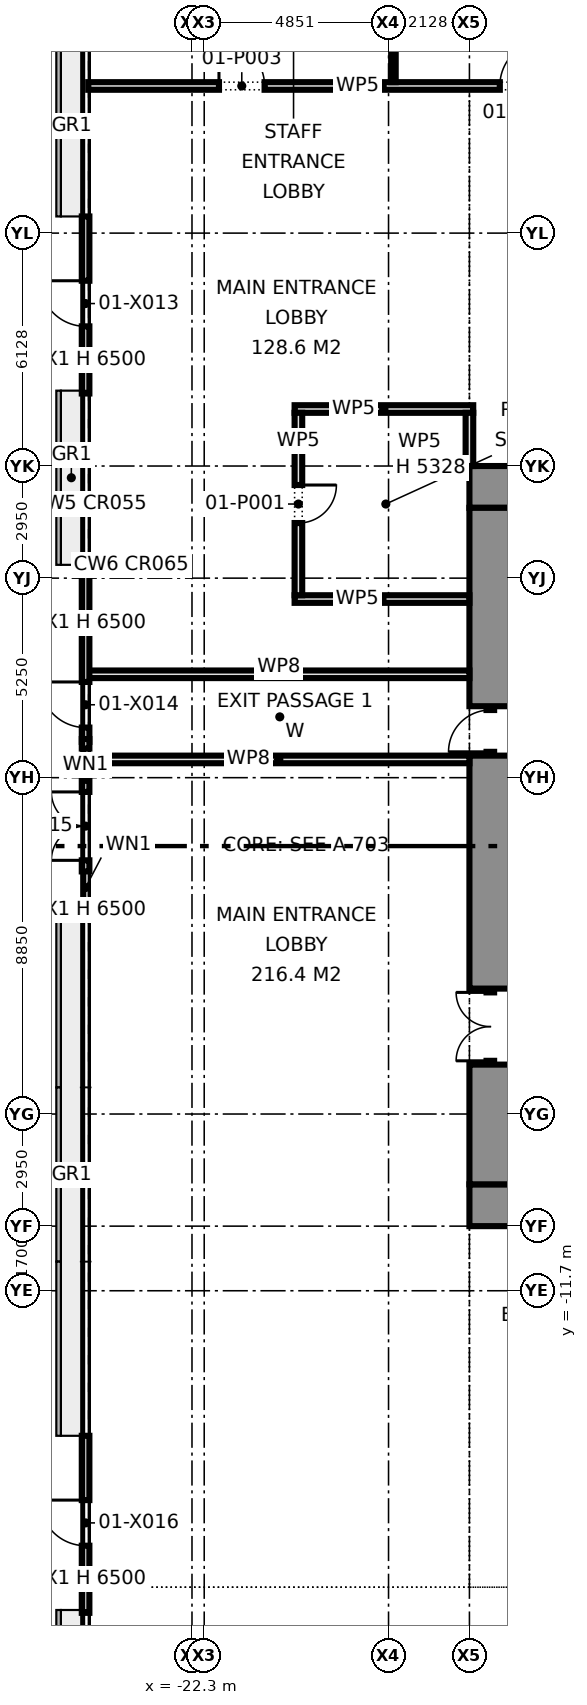
"""IFC4 building model, lengths in metres.
Left out: names, types, materials, properties, quantities, classifications, styles, units other than length and angle.
Written with IfcOpenShell. Run it as: python <this file> out.ifc"""

import sys

from ifc_helpers import new_model, si_unit, direction, frame, frame_2d, origin, place, context, subcontext, project, spatial, rectangle, extrude, element, fill, save


model = new_model("IFC4")
c1 = context("Model", 3, precision=1e-05, world=origin(), true_north=direction((0.0, 1.0)))
c2 = subcontext(c1, "Body", "Model", "MODEL_VIEW")
j1 = project(units=[si_unit("LENGTHUNIT", "METRE"), si_unit("PLANEANGLEUNIT", "RADIAN")], contexts=[c1])
p1 = place(None, origin())
s1 = spatial("IfcSite", under=j1, at=p1, CompositionType="ELEMENT")
p2 = place(p1, origin())
s2 = spatial("IfcBuilding", under=s1, at=p2, CompositionType="ELEMENT")
p3 = place(p2, origin())
s3 = spatial("IfcBuildingStorey", under=s2, at=p3, CompositionType="ELEMENT", Elevation=0.0)
p4 = place(p3, frame((-25.1, 16.567, 0.0), z_axis=(0.0, 0.0, 1.0), x_axis=(0.0, -1.0, 0.0)))
e1 = element("IfcWall", 1, at=p4, inside=s3, PredefinedType="STANDARD", context=c2, shape_type="SweptSolid", body=[
    extrude(rectangle(XDim=4.658, YDim=0.2, at=frame_2d((2.329, 0.0))), origin(), (0.0, 0.0, 1.0), 6.5),
])
p5 = place(p4, frame((1.692, 0.0, 0.0)))
e2 = element("IfcOpeningElement", 2, at=p5, cuts=e1, PredefinedType="OPENING", context=c2, shape_type="SweptSolid", body=[
    extrude(rectangle(XDim=1.2, YDim=2.1, at=frame_2d((0.6, 1.05))), frame((0.0, 0.11, 0.0), z_axis=(0.0, -1.0, 0.0), x_axis=(1.0, 0.0, 0.0)), (0.0, 0.0, 1.0), 0.22),
])
p6 = place(p3, frame((-25.1, 7.4, 0.0), z_axis=(0.0, 0.0, 1.0), x_axis=(0.0, -1.0, 0.0)))
e3 = element("IfcWall", 3, at=p6, inside=s3, PredefinedType="STANDARD", context=c2, shape_type="SweptSolid", body=[
    extrude(rectangle(XDim=4.658, YDim=0.2, at=frame_2d((2.329, 0.0))), origin(), (0.0, 0.0, 1.0), 6.5),
])
p7 = place(p6, frame((3.082, 0.0, 0.0)))
e4 = element("IfcOpeningElement", 4, at=p7, cuts=e3, PredefinedType="OPENING", context=c2, shape_type="SweptSolid", body=[
    extrude(rectangle(XDim=1.2, YDim=2.1, at=frame_2d((0.6, 1.05))), frame((0.0, 0.11, 0.0), z_axis=(0.0, -1.0, 0.0), x_axis=(1.0, 0.0, 0.0)), (0.0, 0.0, 1.0), 0.22),
])
p8 = place(p3, frame((-25.1, 2.817, 0.0), z_axis=(0.0, 0.0, 1.0), x_axis=(0.0, -1.0, 0.0)))
e5 = element("IfcWall", 5, at=p8, inside=s3, PredefinedType="STANDARD", context=c2, shape_type="SweptSolid", body=[
    extrude(rectangle(XDim=4.658, YDim=0.2, at=frame_2d((2.329, 0.0))), origin(), (0.0, 0.0, 1.0), 6.5),
])
p9 = place(p8, frame((1.392, 0.0, 0.0)))
e6 = element("IfcOpeningElement", 6, at=p9, cuts=e5, PredefinedType="OPENING", context=c2, shape_type="SweptSolid", body=[
    extrude(rectangle(XDim=1.8, YDim=2.4, at=frame_2d((0.9, 1.2))), frame((0.0, 0.11, 0.0), z_axis=(0.0, -1.0, 0.0), x_axis=(1.0, 0.0, 0.0)), (0.0, 0.0, 1.0), 0.22),
])
p10 = place(p8, frame((0.25, 0.0, 0.0)))
e7 = element("IfcOpeningElement", 7, at=p10, cuts=e5, PredefinedType="OPENING", context=c2, shape_type="SweptSolid", body=[
    extrude(rectangle(XDim=0.85, YDim=2.4, at=frame_2d((0.425, 1.2))), frame((0.0, 0.11, 0.0), z_axis=(0.0, -1.0, 0.0), x_axis=(1.0, 0.0, 0.0)), (0.0, 0.0, 1.0), 0.22),
])
p11 = place(p8, frame((3.483, 0.0, 0.0)))
e8 = element("IfcOpeningElement", 8, at=p11, cuts=e5, PredefinedType="OPENING", context=c2, shape_type="SweptSolid", body=[
    extrude(rectangle(XDim=0.85, YDim=2.4, at=frame_2d((0.425, 1.2))), frame((0.0, 0.11, 0.0), z_axis=(0.0, -1.0, 0.0), x_axis=(1.0, 0.0, 0.0)), (0.0, 0.0, 1.0), 0.22),
])
p12 = place(p3, frame((-25.1, -15.517, 0.0), z_axis=(0.0, 0.0, 1.0), x_axis=(0.0, -1.0, 0.0)))
e9 = element("IfcWall", 9, at=p12, inside=s3, PredefinedType="STANDARD", context=c2, shape_type="SweptSolid", body=[
    extrude(rectangle(XDim=4.658, YDim=0.2, at=frame_2d((2.329, 0.0))), origin(), (0.0, 0.0, 1.0), 6.5),
])
p13 = place(p12, frame((1.692, 0.0, 0.0)))
e10 = element("IfcOpeningElement", 10, at=p13, cuts=e9, PredefinedType="OPENING", context=c2, shape_type="SweptSolid", body=[
    extrude(rectangle(XDim=1.2, YDim=2.1, at=frame_2d((0.6, 1.05))), frame((0.0, 0.11, 0.0), z_axis=(0.0, -1.0, 0.0), x_axis=(1.0, 0.0, 0.0)), (0.0, 0.0, 1.0), 0.22),
])
for number, where, z_axis, x_axis in (
    (11, (-15.0, -9.45, 0.0), (0.0, 0.0, 1.0), (1.0, 0.0, 0.0)),
    (12, (-15.0, 9.45, 0.0), (0.0, 0.0, 1.0), (1.0, 0.0, 0.0)),
):
    element("IfcWall", number, at=place(p3, frame(where, z_axis=z_axis, x_axis=x_axis)), inside=s3, PredefinedType="SHEAR", context=c2, shape_type="SweptSolid", body=[
        extrude(rectangle(XDim=11.0, YDim=1.1, at=frame_2d((5.5, 0.0))), origin(), (0.0, 0.0, 1.0), 6.275),
    ])
p14 = place(p3, frame((-14.45, -8.9, 0.0), z_axis=(0.0, 0.0, 1.0), x_axis=(0.0, 1.0, 0.0)))
e13 = element("IfcWall", 13, at=p14, inside=s3, PredefinedType="SHEAR", context=c2, shape_type="SweptSolid", body=[
    extrude(rectangle(XDim=3.15, YDim=1.1, at=frame_2d((1.575, 0.0))), origin(), (0.0, 0.0, 1.0), 6.275),
])
p15 = place(p3, frame((-14.45, -5.75, 0.0), z_axis=(0.0, 0.0, 1.0), x_axis=(0.0, 1.0, 0.0)))
e14 = element("IfcWall", 14, at=p15, inside=s3, PredefinedType="PARTITIONING", context=c2, shape_type="SweptSolid", body=[
    extrude(rectangle(XDim=2.0, YDim=0.2, at=frame_2d((1.0, 0.0))), origin(), (0.0, 0.0, 1.0), 2.4),
])
p16 = place(p15, frame((0.1, 0.0, 0.0)))
e15 = element("IfcOpeningElement", 15, at=p16, cuts=e14, PredefinedType="OPENING", context=c2, shape_type="SweptSolid", body=[
    extrude(rectangle(XDim=1.8, YDim=2.1, at=frame_2d((0.9, 1.05))), frame((0.0, 0.11, 0.0), z_axis=(0.0, -1.0, 0.0), x_axis=(1.0, 0.0, 0.0)), (0.0, 0.0, 1.0), 0.22),
])
p17 = place(p3, frame((-14.45, -3.75, 0.0), z_axis=(0.0, 0.0, 1.0), x_axis=(0.0, 1.0, 0.0)))
e16 = element("IfcWall", 16, at=p17, inside=s3, PredefinedType="SHEAR", context=c2, shape_type="SweptSolid", body=[
    extrude(rectangle(XDim=6.13, YDim=1.1, at=frame_2d((3.065, 0.0))), origin(), (0.0, 0.0, 1.0), 6.275),
])
p18 = place(p3, frame((-14.45, 2.38, 0.0), z_axis=(0.0, 0.0, 1.0), x_axis=(0.0, 1.0, 0.0)))
e17 = element("IfcWall", 17, at=p18, inside=s3, PredefinedType="SHEAR", context=c2, shape_type="SweptSolid", body=[
    extrude(rectangle(XDim=1.3, YDim=0.2, at=frame_2d((0.65, 0.0))), origin(), (0.0, 0.0, 1.0), 2.4),
])
p19 = place(p18, frame((0.1, 0.0, 0.0)))
e18 = element("IfcOpeningElement", 18, at=p19, cuts=e17, PredefinedType="OPENING", context=c2, shape_type="SweptSolid", body=[
    extrude(rectangle(XDim=1.1, YDim=2.1, at=frame_2d((0.55, 1.05))), frame((0.0, 0.11, 0.0), z_axis=(0.0, -1.0, 0.0), x_axis=(1.0, 0.0, 0.0)), (0.0, 0.0, 1.0), 0.22),
])
p20 = place(p3, frame((-14.45, 3.68, 0.0), z_axis=(0.0, 0.0, 1.0), x_axis=(0.0, 1.0, 0.0)))
e19 = element("IfcWall", 19, at=p20, inside=s3, PredefinedType="SHEAR", context=c2, shape_type="SweptSolid", body=[
    extrude(rectangle(XDim=5.22, YDim=1.1, at=frame_2d((2.61, 0.0))), origin(), (0.0, 0.0, 1.0), 6.275),
])
p21 = place(p3, frame((-19.6, 6.5, 0.0), z_axis=(0.0, 0.0, 1.0), x_axis=(1.0, 0.0, 0.0)))
e20 = element("IfcWall", 20, at=p21, inside=s3, PredefinedType="PARTITIONING", context=c2, shape_type="SweptSolid", body=[
    extrude(rectangle(XDim=4.6, YDim=0.2, at=frame_2d((2.3, 0.0))), origin(), (0.0, 0.0, 1.0), 6.275),
])
p22 = place(p3, frame((-19.6, 11.5, 0.0), z_axis=(0.0, 0.0, 1.0), x_axis=(1.0, 0.0, 0.0)))
e21 = element("IfcWall", 21, at=p22, inside=s3, PredefinedType="PARTITIONING", context=c2, shape_type="SweptSolid", body=[
    extrude(rectangle(XDim=4.7, YDim=0.2, at=frame_2d((2.35, 0.0))), origin(), (0.0, 0.0, 1.0), 6.275),
])
p23 = place(p3, frame((-25.03, 20.0, 0.0), z_axis=(0.0, 0.0, 1.0), x_axis=(1.0, 0.0, 0.0)))
e22 = element("IfcWall", 22, at=p23, inside=s3, PredefinedType="PARTITIONING", context=c2, shape_type="SweptSolid", body=[
    extrude(rectangle(XDim=14.93, YDim=0.2, at=frame_2d((7.465, 0.0))), origin(), (0.0, 0.0, 1.0), 6.275),
])
p24 = place(p23, frame((3.44, 0.0, 0.0)))
e23 = element("IfcOpeningElement", 23, at=p24, cuts=e22, PredefinedType="OPENING", context=c2, shape_type="SweptSolid", body=[
    extrude(rectangle(XDim=1.2, YDim=2.1, at=frame_2d((0.6, 1.05))), frame((0.0, 0.11, 0.0), z_axis=(0.0, -1.0, 0.0), x_axis=(1.0, 0.0, 0.0)), (0.0, 0.0, 1.0), 0.22),
])
p25 = place(p23, frame((10.83, 0.0, 0.0)))
e24 = element("IfcOpeningElement", 24, at=p25, cuts=e22, PredefinedType="OPENING", context=c2, shape_type="SweptSolid", body=[
    extrude(rectangle(XDim=1.2, YDim=2.1, at=frame_2d((0.6, 1.05))), frame((0.0, 0.11, 0.0), z_axis=(0.0, -1.0, 0.0), x_axis=(1.0, 0.0, 0.0)), (0.0, 0.0, 1.0), 0.22),
])
p26 = place(p3, frame((-15.0, 10.0, 0.0), z_axis=(0.0, 0.0, 1.0), x_axis=(0.0, 1.0, 0.0)))
e25 = element("IfcWall", 25, at=p26, inside=s3, PredefinedType="PARTITIONING", context=c2, shape_type="SweptSolid", body=[
    extrude(rectangle(XDim=1.4, YDim=0.2, at=frame_2d((0.7, 0.0))), origin(), (0.0, 0.0, 1.0), 5.328),
])
p27 = place(p3, frame((-19.5, 6.6, 0.0), z_axis=(0.0, 0.0, 1.0), x_axis=(0.0, 1.0, 0.0)))
e26 = element("IfcWall", 26, at=p27, inside=s3, PredefinedType="PARTITIONING", context=c2, shape_type="SweptSolid", body=[
    extrude(rectangle(XDim=4.8, YDim=0.2, at=frame_2d((2.4, 0.0))), origin(), (0.0, 0.0, 1.0), 6.275),
])
p28 = place(p27, frame((1.9, 0.0, 0.0)))
e27 = element("IfcOpeningElement", 27, at=p28, cuts=e26, PredefinedType="OPENING", context=c2, shape_type="SweptSolid", body=[
    extrude(rectangle(XDim=1.0, YDim=2.1, at=frame_2d((0.5, 1.05))), frame((0.0, 0.11, 0.0), z_axis=(0.0, -1.0, 0.0), x_axis=(1.0, 0.0, 0.0)), (0.0, 0.0, 1.0), 0.22),
])
p29 = place(p3, frame((-17.0, 20.1, 0.0), z_axis=(0.0, 0.0, 1.0), x_axis=(0.0, 1.0, 0.0)))
e28 = element("IfcWall", 28, at=p29, inside=s3, PredefinedType="PARTITIONING", context=c2, shape_type="SweptSolid", body=[
    extrude(rectangle(XDim=4.93, YDim=0.12, at=frame_2d((2.465, 0.0))), origin(), (0.0, 0.0, 1.0), 6.275),
])
for number, where, z_axis, x_axis in (
    (29, (-25.03, 2.28, 0.0), (0.0, 0.0, 1.0), (1.0, 0.0, 0.0)),
    (30, (-25.03, 4.52, 0.0), (0.0, 0.0, 1.0), (1.0, 0.0, 0.0)),
):
    element("IfcWall", number, at=place(p3, frame(where, z_axis=z_axis, x_axis=x_axis)), inside=s3, PredefinedType="PARTITIONING", context=c2, shape_type="SweptSolid", body=[
        extrude(rectangle(XDim=10.03, YDim=0.2, at=frame_2d((5.015, 0.0))), origin(), (0.0, 0.0, 1.0), 6.275),
    ])
p30 = place(p5, frame((1.2, 0.0, 0.0), z_axis=(0.0, 0.0, 1.0), x_axis=(-1.0, 0.0, 0.0)))
e31 = element("IfcDoor", 31, at=p30, inside=s3, OperationType="SINGLE_SWING_RIGHT", PredefinedType="DOOR", context=c2, shape_type="SweptSolid", body=[
    extrude(rectangle(XDim=1.2, YDim=2.1, at=frame_2d((0.6, 1.05))), frame((0.0, 0.025, 0.0), z_axis=(0.0, -1.0, 0.0), x_axis=(1.0, 0.0, 0.0)), (0.0, 0.0, 1.0), 0.05),
])
fill(e2, e31)
p31 = place(p7, frame((1.2, 0.0, 0.0), z_axis=(0.0, 0.0, 1.0), x_axis=(-1.0, 0.0, 0.0)))
e32 = element("IfcDoor", 32, at=p31, inside=s3, OperationType="SINGLE_SWING_RIGHT", PredefinedType="DOOR", context=c2, shape_type="SweptSolid", body=[
    extrude(rectangle(XDim=1.2, YDim=2.1, at=frame_2d((0.6, 1.05))), frame((0.0, 0.025, 0.0), z_axis=(0.0, -1.0, 0.0), x_axis=(1.0, 0.0, 0.0)), (0.0, 0.0, 1.0), 0.05),
])
fill(e4, e32)
p32 = place(p9, frame((1.8, 0.0, 0.0), z_axis=(0.0, 0.0, 1.0), x_axis=(-1.0, 0.0, 0.0)))
e33 = element("IfcDoor", 33, at=p32, inside=s3, OperationType="DOUBLE_DOOR_DOUBLE_SWING", PredefinedType="DOOR", context=c2, shape_type="SweptSolid", body=[
    extrude(rectangle(XDim=1.8, YDim=2.4, at=frame_2d((0.9, 1.2))), frame((0.0, 0.025, 0.0), z_axis=(0.0, -1.0, 0.0), x_axis=(1.0, 0.0, 0.0)), (0.0, 0.0, 1.0), 0.05),
])
fill(e6, e33)
p33 = place(p10, origin())
e34 = element("IfcWindow", 34, at=p33, inside=s3, PartitioningType="SINGLE_PANEL", PredefinedType="WINDOW", context=c2, shape_type="SweptSolid", body=[
    extrude(rectangle(XDim=0.85, YDim=2.4, at=frame_2d((0.425, 1.2))), frame((0.0, 0.03, 0.0), z_axis=(0.0, -1.0, 0.0), x_axis=(1.0, 0.0, 0.0)), (0.0, 0.0, 1.0), 0.06),
])
fill(e7, e34)
p34 = place(p11, origin())
e35 = element("IfcWindow", 35, at=p34, inside=s3, PartitioningType="SINGLE_PANEL", PredefinedType="WINDOW", context=c2, shape_type="SweptSolid", body=[
    extrude(rectangle(XDim=0.85, YDim=2.4, at=frame_2d((0.425, 1.2))), frame((0.0, 0.03, 0.0), z_axis=(0.0, -1.0, 0.0), x_axis=(1.0, 0.0, 0.0)), (0.0, 0.0, 1.0), 0.06),
])
fill(e8, e35)
p35 = place(p13, frame((1.2, 0.0, 0.0), z_axis=(0.0, 0.0, 1.0), x_axis=(-1.0, 0.0, 0.0)))
e36 = element("IfcDoor", 36, at=p35, inside=s3, OperationType="SINGLE_SWING_RIGHT", PredefinedType="DOOR", context=c2, shape_type="SweptSolid", body=[
    extrude(rectangle(XDim=1.2, YDim=2.1, at=frame_2d((0.6, 1.05))), frame((0.0, 0.025, 0.0), z_axis=(0.0, -1.0, 0.0), x_axis=(1.0, 0.0, 0.0)), (0.0, 0.0, 1.0), 0.05),
])
fill(e10, e36)
p36 = place(p16, origin())
e37 = element("IfcDoor", 37, at=p36, inside=s3, OperationType="DOUBLE_DOOR_SINGLE_SWING", PredefinedType="DOOR", context=c2, shape_type="SweptSolid", body=[
    extrude(rectangle(XDim=1.8, YDim=2.1, at=frame_2d((0.9, 1.05))), frame((0.0, 0.025, 0.0), z_axis=(0.0, -1.0, 0.0), x_axis=(1.0, 0.0, 0.0)), (0.0, 0.0, 1.0), 0.05),
])
fill(e15, e37)
p37 = place(p19, origin())
e38 = element("IfcDoor", 38, at=p37, inside=s3, OperationType="SINGLE_SWING_LEFT", PredefinedType="DOOR", context=c2, shape_type="SweptSolid", body=[
    extrude(rectangle(XDim=1.1, YDim=2.1, at=frame_2d((0.55, 1.05))), frame((0.0, 0.025, 0.0), z_axis=(0.0, -1.0, 0.0), x_axis=(1.0, 0.0, 0.0)), (0.0, 0.0, 1.0), 0.05),
])
fill(e18, e38)
p38 = place(p28, frame((1.0, 0.0, 0.0), z_axis=(0.0, 0.0, 1.0), x_axis=(-1.0, 0.0, 0.0)))
e39 = element("IfcDoor", 39, at=p38, inside=s3, OperationType="SINGLE_SWING_LEFT", PredefinedType="DOOR", context=c2, shape_type="SweptSolid", body=[
    extrude(rectangle(XDim=1.0, YDim=2.1, at=frame_2d((0.5, 1.05))), frame((0.0, 0.025, 0.0), z_axis=(0.0, -1.0, 0.0), x_axis=(1.0, 0.0, 0.0)), (0.0, 0.0, 1.0), 0.05),
])
fill(e27, e39)
p39 = place(p24, origin())
e40 = element("IfcDoor", 40, at=p39, inside=s3, OperationType="SINGLE_SWING_LEFT", PredefinedType="DOOR", context=c2, shape_type="SweptSolid", body=[
    extrude(rectangle(XDim=1.2, YDim=2.1, at=frame_2d((0.6, 1.05))), frame((0.0, 0.025, 0.0), z_axis=(0.0, -1.0, 0.0), x_axis=(1.0, 0.0, 0.0)), (0.0, 0.0, 1.0), 0.05),
])
fill(e23, e40)
p40 = place(p25, origin())
e41 = element("IfcDoor", 41, at=p40, inside=s3, OperationType="SINGLE_SWING_RIGHT", PredefinedType="DOOR", context=c2, shape_type="SweptSolid", body=[
    extrude(rectangle(XDim=1.2, YDim=2.1, at=frame_2d((0.6, 1.05))), frame((0.0, 0.025, 0.0), z_axis=(0.0, -1.0, 0.0), x_axis=(1.0, 0.0, 0.0)), (0.0, 0.0, 1.0), 0.05),
])
fill(e24, e41)
save(model, sys.argv[1])
